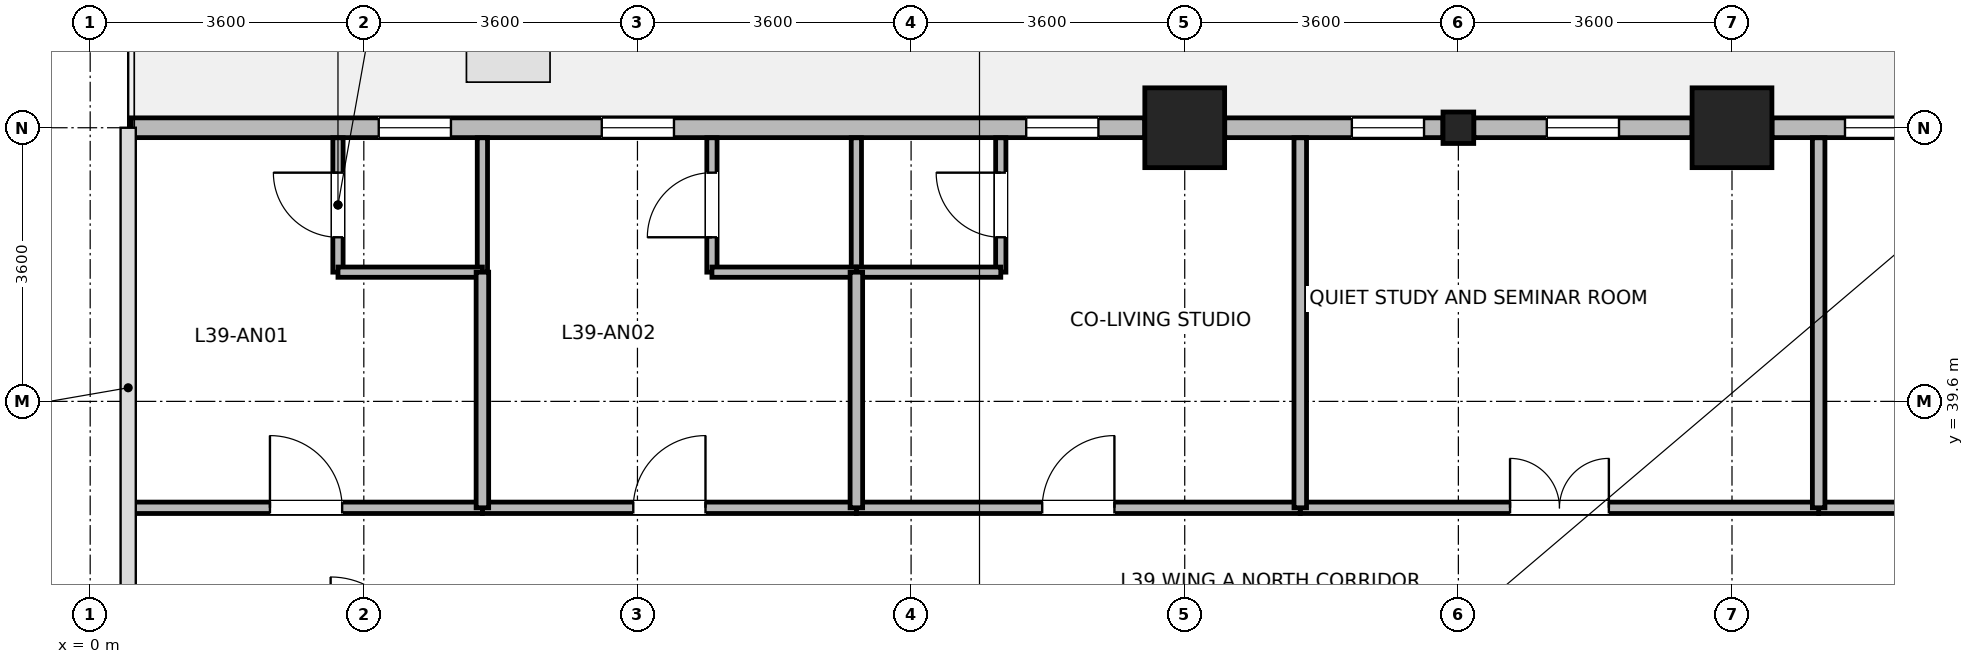
"""IFC4 building model, lengths in metres.
Left out: names, types, materials, properties, quantities, classifications, styles, units other than length and angle.
Written with IfcOpenShell. Run it as: python <this file> out.ifc"""

import sys

from ifc_helpers import new_model, si_unit, direction, frame, frame_2d, origin, origin_2d, place, context, subcontext, project, spatial, rectangle, i_section, extrude, source, transform, mapped, element, fill, save


model = new_model("IFC4")
c1 = context("Model", 3, precision=1e-05, world=origin(), true_north=direction((0.0, 1.0)))
c2 = subcontext(c1, "Body", "Model", "MODEL_VIEW")
j1 = project(units=[si_unit("LENGTHUNIT", "METRE"), si_unit("PLANEANGLEUNIT", "RADIAN")], contexts=[c1])
p1 = place(None, origin())
s1 = spatial("IfcSite", under=j1, at=p1, CompositionType="ELEMENT")
p2 = place(p1, origin())
s2 = spatial("IfcBuilding", under=s1, at=p2, CompositionType="ELEMENT")
p3 = place(p2, frame((0.0, 0.0, 155.0)))
s3 = spatial("IfcBuildingStorey", under=s2, at=p3, CompositionType="ELEMENT", Elevation=155.0)
m1 = source(origin(), c2, "Body", "SweptSolid", [
    extrude(rectangle(XDim=1.05, YDim=1.05, at=origin_2d()), origin(), (0.0, 0.0, 1.0), 3.7),
])
for number, where, z_axis, x_axis in (
    (1, (14.4, 43.2, 0.0), (0.0, 0.0, 1.0), (1.0, 0.0, 0.0)),
    (2, (21.6, 43.2, 0.0), (0.0, 0.0, 1.0), (1.0, 0.0, 0.0)),
):
    element("IfcColumn", number, at=place(p3, frame(where, z_axis=z_axis, x_axis=x_axis)), inside=s3, PredefinedType="COLUMN", context=c2, shape_type="MappedRepresentation", body=[
        mapped(m1, transform((0.0, 0.0, 0.0), x_axis=(1.0, 0.0, 0.0), y_axis=(0.0, 1.0, 0.0), z_axis=(0.0, 0.0, 1.0), scale=1.0)),
    ])
m2 = source(origin(), c2, "Body", "SweptSolid", [
    extrude(i_section(OverallWidth=0.404, OverallDepth=0.414, WebThickness=0.021, FlangeThickness=0.028, FilletRadius=0.015, at=origin_2d()), origin(), (0.0, 0.0, 1.0), 3.7),
])
p4 = place(p3, frame((18.0, 43.2, 0.0), z_axis=(0.0, 0.0, 1.0), x_axis=(1.0, 0.0, 0.0)))
e3 = element("IfcColumn", 3, at=p4, inside=s3, PredefinedType="COLUMN", context=c2, shape_type="MappedRepresentation", body=[
    mapped(m2, transform((0.0, 0.0, 0.0), x_axis=(1.0, 0.0, 0.0), y_axis=(0.0, 1.0, 0.0), z_axis=(0.0, 0.0, 1.0), scale=1.0)),
])
p5 = place(p3, frame((22.126, 43.2, 0.0), z_axis=(0.0, 0.0, 1.0), x_axis=(1.0, 0.0, 0.0)))
e4 = element("IfcWall", 4, at=p5, inside=s3, PredefinedType="STANDARD", context=c2, shape_type="SweptSolid", body=[
    extrude(rectangle(XDim=2.871, YDim=0.26, at=frame_2d((1.436, 0.0))), origin(), (0.0, 0.0, 1.0), 2.99),
])
p6 = place(p5, frame((0.96, 0.0, 0.85)))
e5 = element("IfcOpeningElement", 5, at=p6, cuts=e4, PredefinedType="OPENING", context=c2, shape_type="SweptSolid", body=[
    extrude(rectangle(XDim=0.95, YDim=1.75, at=frame_2d((0.475, 0.875))), frame((0.0, 0.14, 0.0), z_axis=(0.0, -1.0, 0.0), x_axis=(1.0, 0.0, 0.0)), (0.0, 0.0, 1.0), 0.28),
])
p7 = place(p3, frame((18.203, 43.2, 0.0), z_axis=(0.0, 0.0, 1.0), x_axis=(1.0, 0.0, 0.0)))
e6 = element("IfcWall", 6, at=p7, inside=s3, PredefinedType="STANDARD", context=c2, shape_type="SweptSolid", body=[
    extrude(rectangle(XDim=2.871, YDim=0.26, at=frame_2d((1.436, 0.0))), origin(), (0.0, 0.0, 1.0), 2.99),
])
p8 = place(p7, frame((0.96, 0.0, 0.85)))
e7 = element("IfcOpeningElement", 7, at=p8, cuts=e6, PredefinedType="OPENING", context=c2, shape_type="SweptSolid", body=[
    extrude(rectangle(XDim=0.95, YDim=1.75, at=frame_2d((0.475, 0.875))), frame((0.0, 0.14, 0.0), z_axis=(0.0, -1.0, 0.0), x_axis=(1.0, 0.0, 0.0)), (0.0, 0.0, 1.0), 0.28),
])
p9 = place(p3, frame((14.926, 43.2, 0.0), z_axis=(0.0, 0.0, 1.0), x_axis=(1.0, 0.0, 0.0)))
e8 = element("IfcWall", 8, at=p9, inside=s3, PredefinedType="STANDARD", context=c2, shape_type="SweptSolid", body=[
    extrude(rectangle(XDim=2.871, YDim=0.26, at=frame_2d((1.436, 0.0))), origin(), (0.0, 0.0, 1.0), 2.99),
])
p10 = place(p9, frame((1.673, 0.0, 0.85)))
e9 = element("IfcOpeningElement", 9, at=p10, cuts=e8, PredefinedType="OPENING", context=c2, shape_type="SweptSolid", body=[
    extrude(rectangle(XDim=0.95, YDim=1.75, at=frame_2d((0.475, 0.875))), frame((0.0, 0.14, 0.0), z_axis=(0.0, -1.0, 0.0), x_axis=(1.0, 0.0, 0.0)), (0.0, 0.0, 1.0), 0.28),
])
p11 = place(p3, frame((0.537, 43.2, 0.0), z_axis=(0.0, 0.0, 1.0), x_axis=(1.0, 0.0, 0.0)))
e10 = element("IfcWall", 10, at=p11, inside=s3, PredefinedType="STANDARD", context=c2, shape_type="SweptSolid", body=[
    extrude(rectangle(XDim=13.337, YDim=0.26, at=frame_2d((6.668, 0.0))), origin(), (0.0, 0.0, 1.0), 3.44),
])
p12 = place(p11, frame((6.194, 0.0, 0.85)))
e11 = element("IfcOpeningElement", 11, at=p12, cuts=e10, PredefinedType="OPENING", context=c2, shape_type="SweptSolid", body=[
    extrude(rectangle(XDim=0.95, YDim=1.75, at=frame_2d((0.475, 0.875))), frame((0.0, 0.14, 0.0), z_axis=(0.0, -1.0, 0.0), x_axis=(1.0, 0.0, 0.0)), (0.0, 0.0, 1.0), 0.28),
])
p13 = place(p11, frame((3.26, 0.0, 0.85)))
e12 = element("IfcOpeningElement", 12, at=p13, cuts=e10, PredefinedType="OPENING", context=c2, shape_type="SweptSolid", body=[
    extrude(rectangle(XDim=0.95, YDim=1.75, at=frame_2d((0.475, 0.875))), frame((0.0, 0.14, 0.0), z_axis=(0.0, -1.0, 0.0), x_axis=(1.0, 0.0, 0.0)), (0.0, 0.0, 1.0), 0.28),
])
p14 = place(p11, frame((11.777, 0.0, 0.85)))
e13 = element("IfcOpeningElement", 13, at=p14, cuts=e10, PredefinedType="OPENING", context=c2, shape_type="SweptSolid", body=[
    extrude(rectangle(XDim=0.95, YDim=1.75, at=frame_2d((0.475, 0.875))), frame((0.0, 0.14, 0.0), z_axis=(0.0, -1.0, 0.0), x_axis=(1.0, 0.0, 0.0)), (0.0, 0.0, 1.0), 0.28),
])
p15 = place(p3, frame((3.26, 41.3, 0.0), z_axis=(0.0, 0.0, 1.0), x_axis=(0.0, 1.0, 0.0)))
e14 = element("IfcWall", 14, at=p15, inside=s3, PredefinedType="PARTITIONING", context=c2, shape_type="SweptSolid", body=[
    extrude(rectangle(XDim=1.768, YDim=0.135, at=frame_2d((0.884, 0.0))), origin(), (0.0, 0.0, 1.0), 3.44),
])
p16 = place(p15, frame((0.459, 0.0, 0.0)))
e15 = element("IfcOpeningElement", 15, at=p16, cuts=e14, PredefinedType="OPENING", context=c2, shape_type="SweptSolid", body=[
    extrude(rectangle(XDim=0.85, YDim=2.04, at=frame_2d((0.425, 1.02))), frame((0.0, 0.078, 0.0), z_axis=(0.0, -1.0, 0.0), x_axis=(1.0, 0.0, 0.0)), (0.0, 0.0, 1.0), 0.155),
])
p17 = place(p3, frame((5.16, 41.3, 0.0), z_axis=(0.0, 0.0, 1.0), x_axis=(0.0, 1.0, 0.0)))
e16 = element("IfcWall", 16, at=p17, inside=s3, PredefinedType="PARTITIONING", context=c2, shape_type="SweptSolid", body=[
    extrude(rectangle(XDim=1.768, YDim=0.135, at=frame_2d((0.884, 0.0))), origin(), (0.0, 0.0, 1.0), 3.44),
])
p18 = place(p3, frame((8.18, 41.3, 0.0), z_axis=(0.0, 0.0, 1.0), x_axis=(0.0, 1.0, 0.0)))
e17 = element("IfcWall", 17, at=p18, inside=s3, PredefinedType="PARTITIONING", context=c2, shape_type="SweptSolid", body=[
    extrude(rectangle(XDim=1.768, YDim=0.135, at=frame_2d((0.884, 0.0))), origin(), (0.0, 0.0, 1.0), 3.44),
])
p19 = place(p18, frame((0.459, 0.0, 0.0)))
e18 = element("IfcOpeningElement", 18, at=p19, cuts=e17, PredefinedType="OPENING", context=c2, shape_type="SweptSolid", body=[
    extrude(rectangle(XDim=0.85, YDim=2.04, at=frame_2d((0.425, 1.02))), frame((0.0, 0.078, 0.0), z_axis=(0.0, -1.0, 0.0), x_axis=(1.0, 0.0, 0.0)), (0.0, 0.0, 1.0), 0.155),
])
p20 = place(p3, frame((10.08, 41.3, 0.0), z_axis=(0.0, 0.0, 1.0), x_axis=(0.0, 1.0, 0.0)))
e19 = element("IfcWall", 19, at=p20, inside=s3, PredefinedType="PARTITIONING", context=c2, shape_type="SweptSolid", body=[
    extrude(rectangle(XDim=1.768, YDim=0.135, at=frame_2d((0.884, 0.0))), origin(), (0.0, 0.0, 1.0), 3.44),
])
p21 = place(p3, frame((11.98, 41.3, 0.0), z_axis=(0.0, 0.0, 1.0), x_axis=(0.0, 1.0, 0.0)))
e20 = element("IfcWall", 20, at=p21, inside=s3, PredefinedType="PARTITIONING", context=c2, shape_type="SweptSolid", body=[
    extrude(rectangle(XDim=1.768, YDim=0.135, at=frame_2d((0.884, 0.0))), origin(), (0.0, 0.0, 1.0), 3.44),
])
p22 = place(p21, frame((0.459, 0.0, 0.0)))
e21 = element("IfcOpeningElement", 21, at=p22, cuts=e20, PredefinedType="OPENING", context=c2, shape_type="SweptSolid", body=[
    extrude(rectangle(XDim=0.85, YDim=2.04, at=frame_2d((0.425, 1.02))), frame((0.0, 0.078, 0.0), z_axis=(0.0, -1.0, 0.0), x_axis=(1.0, 0.0, 0.0)), (0.0, 0.0, 1.0), 0.155),
])
p23 = place(p3, frame((3.26, 41.3, 0.0), z_axis=(0.0, 0.0, 1.0), x_axis=(1.0, 0.0, 0.0)))
e22 = element("IfcWall", 22, at=p23, inside=s3, PredefinedType="PARTITIONING", context=c2, shape_type="SweptSolid", body=[
    extrude(rectangle(XDim=1.9, YDim=0.135, at=frame_2d((0.95, 0.0))), origin(), (0.0, 0.0, 1.0), 3.44),
])
p24 = place(p3, frame((8.18, 41.3, 0.0), z_axis=(0.0, 0.0, 1.0), x_axis=(1.0, 0.0, 0.0)))
e23 = element("IfcWall", 23, at=p24, inside=s3, PredefinedType="PARTITIONING", context=c2, shape_type="SweptSolid", body=[
    extrude(rectangle(XDim=1.9, YDim=0.135, at=frame_2d((0.95, 0.0))), origin(), (0.0, 0.0, 1.0), 3.44),
])
p25 = place(p3, frame((10.08, 41.3, 0.0), z_axis=(0.0, 0.0, 1.0), x_axis=(1.0, 0.0, 0.0)))
e24 = element("IfcWall", 24, at=p25, inside=s3, PredefinedType="PARTITIONING", context=c2, shape_type="SweptSolid", body=[
    extrude(rectangle(XDim=1.9, YDim=0.135, at=frame_2d((0.95, 0.0))), origin(), (0.0, 0.0, 1.0), 3.44),
])
p26 = place(p3, frame((22.74, 38.2, 0.0), z_axis=(0.0, 0.0, 1.0), x_axis=(1.0, 0.0, 0.0)))
e25 = element("IfcWall", 25, at=p26, inside=s3, PredefinedType="PARTITIONING", context=c2, shape_type="SweptSolid", body=[
    extrude(rectangle(XDim=7.82, YDim=0.15, at=frame_2d((3.91, 0.0))), origin(), (0.0, 0.0, 1.0), 3.44),
])
p27 = place(p26, frame((3.46, 0.0, 0.0)))
e26 = element("IfcOpeningElement", 26, at=p27, cuts=e25, PredefinedType="OPENING", context=c2, shape_type="SweptSolid", body=[
    extrude(rectangle(XDim=0.9, YDim=2.08, at=frame_2d((0.45, 1.04))), frame((0.0, 0.085, 0.0), z_axis=(0.0, -1.0, 0.0), x_axis=(1.0, 0.0, 0.0)), (0.0, 0.0, 1.0), 0.17),
])
p28 = place(p3, frame((15.92, 38.2, 0.0), z_axis=(0.0, 0.0, 1.0), x_axis=(1.0, 0.0, 0.0)))
e27 = element("IfcWall", 27, at=p28, inside=s3, PredefinedType="PARTITIONING", context=c2, shape_type="SweptSolid", body=[
    extrude(rectangle(XDim=6.82, YDim=0.15, at=frame_2d((3.41, 0.0))), origin(), (0.0, 0.0, 1.0), 3.44),
])
p29 = place(p28, frame((2.76, 0.0, 0.0)))
e28 = element("IfcOpeningElement", 28, at=p29, cuts=e27, PredefinedType="OPENING", context=c2, shape_type="SweptSolid", body=[
    extrude(rectangle(XDim=1.3, YDim=2.12, at=frame_2d((0.65, 1.06))), frame((0.0, 0.085, 0.0), z_axis=(0.0, -1.0, 0.0), x_axis=(1.0, 0.0, 0.0)), (0.0, 0.0, 1.0), 0.17),
])
p30 = place(p3, frame((10.08, 38.2, 0.0), z_axis=(0.0, 0.0, 1.0), x_axis=(1.0, 0.0, 0.0)))
e29 = element("IfcWall", 29, at=p30, inside=s3, PredefinedType="PARTITIONING", context=c2, shape_type="SweptSolid", body=[
    extrude(rectangle(XDim=5.84, YDim=0.15, at=frame_2d((2.92, 0.0))), origin(), (0.0, 0.0, 1.0), 3.44),
])
p31 = place(p30, frame((2.445, 0.0, 0.0)))
e30 = element("IfcOpeningElement", 30, at=p31, cuts=e29, PredefinedType="OPENING", context=c2, shape_type="SweptSolid", body=[
    extrude(rectangle(XDim=0.95, YDim=2.1, at=frame_2d((0.475, 1.05))), frame((0.0, 0.085, 0.0), z_axis=(0.0, -1.0, 0.0), x_axis=(1.0, 0.0, 0.0)), (0.0, 0.0, 1.0), 0.17),
])
p32 = place(p3, frame((5.16, 38.2, 0.0), z_axis=(0.0, 0.0, 1.0), x_axis=(1.0, 0.0, 0.0)))
e31 = element("IfcWall", 31, at=p32, inside=s3, PredefinedType="PARTITIONING", context=c2, shape_type="SweptSolid", body=[
    extrude(rectangle(XDim=4.92, YDim=0.15, at=frame_2d((2.46, 0.0))), origin(), (0.0, 0.0, 1.0), 3.44),
])
p33 = place(p32, frame((1.985, 0.0, 0.0)))
e32 = element("IfcOpeningElement", 32, at=p33, cuts=e31, PredefinedType="OPENING", context=c2, shape_type="SweptSolid", body=[
    extrude(rectangle(XDim=0.95, YDim=2.1, at=frame_2d((0.475, 1.05))), frame((0.0, 0.085, 0.0), z_axis=(0.0, -1.0, 0.0), x_axis=(1.0, 0.0, 0.0)), (0.0, 0.0, 1.0), 0.17),
])
p34 = place(p3, frame((0.52, 38.2, 0.0), z_axis=(0.0, 0.0, 1.0), x_axis=(1.0, 0.0, 0.0)))
e33 = element("IfcWall", 33, at=p34, inside=s3, PredefinedType="PARTITIONING", context=c2, shape_type="SweptSolid", body=[
    extrude(rectangle(XDim=4.64, YDim=0.15, at=frame_2d((2.32, 0.0))), origin(), (0.0, 0.0, 1.0), 3.44),
])
p35 = place(p34, frame((1.845, 0.0, 0.0)))
e34 = element("IfcOpeningElement", 34, at=p35, cuts=e33, PredefinedType="OPENING", context=c2, shape_type="SweptSolid", body=[
    extrude(rectangle(XDim=0.95, YDim=2.1, at=frame_2d((0.475, 1.05))), frame((0.0, 0.085, 0.0), z_axis=(0.0, -1.0, 0.0), x_axis=(1.0, 0.0, 0.0)), (0.0, 0.0, 1.0), 0.17),
])
for number, where, z_axis, x_axis in (
    (35, (15.92, 38.2, 0.0), (0.0, 0.0, 1.0), (0.0, 1.0, 0.0)),
    (36, (22.74, 38.2, 0.0), (0.0, 0.0, 1.0), (0.0, 1.0, 0.0)),
):
    element("IfcWall", number, at=place(p3, frame(where, z_axis=z_axis, x_axis=x_axis)), inside=s3, PredefinedType="PARTITIONING", context=c2, shape_type="SweptSolid", body=[
        extrude(rectangle(XDim=4.868, YDim=0.165, at=frame_2d((2.434, 0.0))), origin(), (0.0, 0.0, 1.0), 3.44),
    ])
for number, where, z_axis, x_axis in (
    (37, (5.16, 38.2, 0.0), (0.0, 0.0, 1.0), (0.0, 1.0, 0.0)),
    (38, (10.08, 38.2, 0.0), (0.0, 0.0, 1.0), (0.0, 1.0, 0.0)),
):
    element("IfcWall", number, at=place(p3, frame(where, z_axis=z_axis, x_axis=x_axis)), inside=s3, PredefinedType="PARTITIONING", context=c2, shape_type="SweptSolid", body=[
        extrude(rectangle(XDim=3.1, YDim=0.165, at=frame_2d((1.55, 0.0))), origin(), (0.0, 0.0, 1.0), 3.44),
    ])
p36 = place(p6, origin())
e39 = element("IfcWindow", 39, at=p36, inside=s3, PartitioningType="SINGLE_PANEL", PredefinedType="WINDOW", context=c2, shape_type="SweptSolid", body=[
    extrude(rectangle(XDim=0.95, YDim=1.75, at=frame_2d((0.475, 0.875))), frame((0.0, 0.03, 0.0), z_axis=(0.0, -1.0, 0.0), x_axis=(1.0, 0.0, 0.0)), (0.0, 0.0, 1.0), 0.06),
])
fill(e5, e39)
p37 = place(p8, origin())
e40 = element("IfcWindow", 40, at=p37, inside=s3, PartitioningType="SINGLE_PANEL", PredefinedType="WINDOW", context=c2, shape_type="SweptSolid", body=[
    extrude(rectangle(XDim=0.95, YDim=1.75, at=frame_2d((0.475, 0.875))), frame((0.0, 0.03, 0.0), z_axis=(0.0, -1.0, 0.0), x_axis=(1.0, 0.0, 0.0)), (0.0, 0.0, 1.0), 0.06),
])
fill(e7, e40)
p38 = place(p10, origin())
e41 = element("IfcWindow", 41, at=p38, inside=s3, PartitioningType="SINGLE_PANEL", PredefinedType="WINDOW", context=c2, shape_type="SweptSolid", body=[
    extrude(rectangle(XDim=0.95, YDim=1.75, at=frame_2d((0.475, 0.875))), frame((0.0, 0.03, 0.0), z_axis=(0.0, -1.0, 0.0), x_axis=(1.0, 0.0, 0.0)), (0.0, 0.0, 1.0), 0.06),
])
fill(e9, e41)
p39 = place(p12, origin())
e42 = element("IfcWindow", 42, at=p39, inside=s3, PartitioningType="SINGLE_PANEL", PredefinedType="WINDOW", context=c2, shape_type="SweptSolid", body=[
    extrude(rectangle(XDim=0.95, YDim=1.75, at=frame_2d((0.475, 0.875))), frame((0.0, 0.03, 0.0), z_axis=(0.0, -1.0, 0.0), x_axis=(1.0, 0.0, 0.0)), (0.0, 0.0, 1.0), 0.06),
])
fill(e11, e42)
p40 = place(p13, origin())
e43 = element("IfcWindow", 43, at=p40, inside=s3, PartitioningType="SINGLE_PANEL", PredefinedType="WINDOW", context=c2, shape_type="SweptSolid", body=[
    extrude(rectangle(XDim=0.95, YDim=1.75, at=frame_2d((0.475, 0.875))), frame((0.0, 0.03, 0.0), z_axis=(0.0, -1.0, 0.0), x_axis=(1.0, 0.0, 0.0)), (0.0, 0.0, 1.0), 0.06),
])
fill(e12, e43)
p41 = place(p14, origin())
e44 = element("IfcWindow", 44, at=p41, inside=s3, PartitioningType="SINGLE_PANEL", PredefinedType="WINDOW", context=c2, shape_type="SweptSolid", body=[
    extrude(rectangle(XDim=0.95, YDim=1.75, at=frame_2d((0.475, 0.875))), frame((0.0, 0.03, 0.0), z_axis=(0.0, -1.0, 0.0), x_axis=(1.0, 0.0, 0.0)), (0.0, 0.0, 1.0), 0.06),
])
fill(e13, e44)
p42 = place(p16, origin())
e45 = element("IfcDoor", 45, at=p42, inside=s3, OperationType="SINGLE_SWING_RIGHT", PredefinedType="DOOR", context=c2, shape_type="SweptSolid", body=[
    extrude(rectangle(XDim=0.85, YDim=2.04, at=frame_2d((0.425, 1.02))), frame((0.0, 0.025, 0.0), z_axis=(0.0, -1.0, 0.0), x_axis=(1.0, 0.0, 0.0)), (0.0, 0.0, 1.0), 0.05),
])
fill(e15, e45)
p43 = place(p19, origin())
e46 = element("IfcDoor", 46, at=p43, inside=s3, OperationType="SINGLE_SWING_LEFT", PredefinedType="DOOR", context=c2, shape_type="SweptSolid", body=[
    extrude(rectangle(XDim=0.85, YDim=2.04, at=frame_2d((0.425, 1.02))), frame((0.0, 0.025, 0.0), z_axis=(0.0, -1.0, 0.0), x_axis=(1.0, 0.0, 0.0)), (0.0, 0.0, 1.0), 0.05),
])
fill(e18, e46)
p44 = place(p22, origin())
e47 = element("IfcDoor", 47, at=p44, inside=s3, OperationType="SINGLE_SWING_RIGHT", PredefinedType="DOOR", context=c2, shape_type="SweptSolid", body=[
    extrude(rectangle(XDim=0.85, YDim=2.04, at=frame_2d((0.425, 1.02))), frame((0.0, 0.025, 0.0), z_axis=(0.0, -1.0, 0.0), x_axis=(1.0, 0.0, 0.0)), (0.0, 0.0, 1.0), 0.05),
])
fill(e21, e47)
p45 = place(p29, origin())
e48 = element("IfcDoor", 48, at=p45, inside=s3, OperationType="DOUBLE_DOOR_SINGLE_SWING", PredefinedType="DOOR", context=c2, shape_type="SweptSolid", body=[
    extrude(rectangle(XDim=1.3, YDim=2.12, at=frame_2d((0.65, 1.06))), frame((0.0, 0.025, 0.0), z_axis=(0.0, -1.0, 0.0), x_axis=(1.0, 0.0, 0.0)), (0.0, 0.0, 1.0), 0.05),
])
fill(e28, e48)
p46 = place(p31, origin())
e49 = element("IfcDoor", 49, at=p46, inside=s3, OperationType="SINGLE_SWING_RIGHT", PredefinedType="DOOR", context=c2, shape_type="SweptSolid", body=[
    extrude(rectangle(XDim=0.95, YDim=2.1, at=frame_2d((0.475, 1.05))), frame((0.0, 0.025, 0.0), z_axis=(0.0, -1.0, 0.0), x_axis=(1.0, 0.0, 0.0)), (0.0, 0.0, 1.0), 0.05),
])
fill(e30, e49)
p47 = place(p33, origin())
e50 = element("IfcDoor", 50, at=p47, inside=s3, OperationType="SINGLE_SWING_RIGHT", PredefinedType="DOOR", context=c2, shape_type="SweptSolid", body=[
    extrude(rectangle(XDim=0.95, YDim=2.1, at=frame_2d((0.475, 1.05))), frame((0.0, 0.025, 0.0), z_axis=(0.0, -1.0, 0.0), x_axis=(1.0, 0.0, 0.0)), (0.0, 0.0, 1.0), 0.05),
])
fill(e32, e50)
p48 = place(p35, origin())
e51 = element("IfcDoor", 51, at=p48, inside=s3, OperationType="SINGLE_SWING_LEFT", PredefinedType="DOOR", context=c2, shape_type="SweptSolid", body=[
    extrude(rectangle(XDim=0.95, YDim=2.1, at=frame_2d((0.475, 1.05))), frame((0.0, 0.025, 0.0), z_axis=(0.0, -1.0, 0.0), x_axis=(1.0, 0.0, 0.0)), (0.0, 0.0, 1.0), 0.05),
])
fill(e34, e51)
save(model, sys.argv[1])
